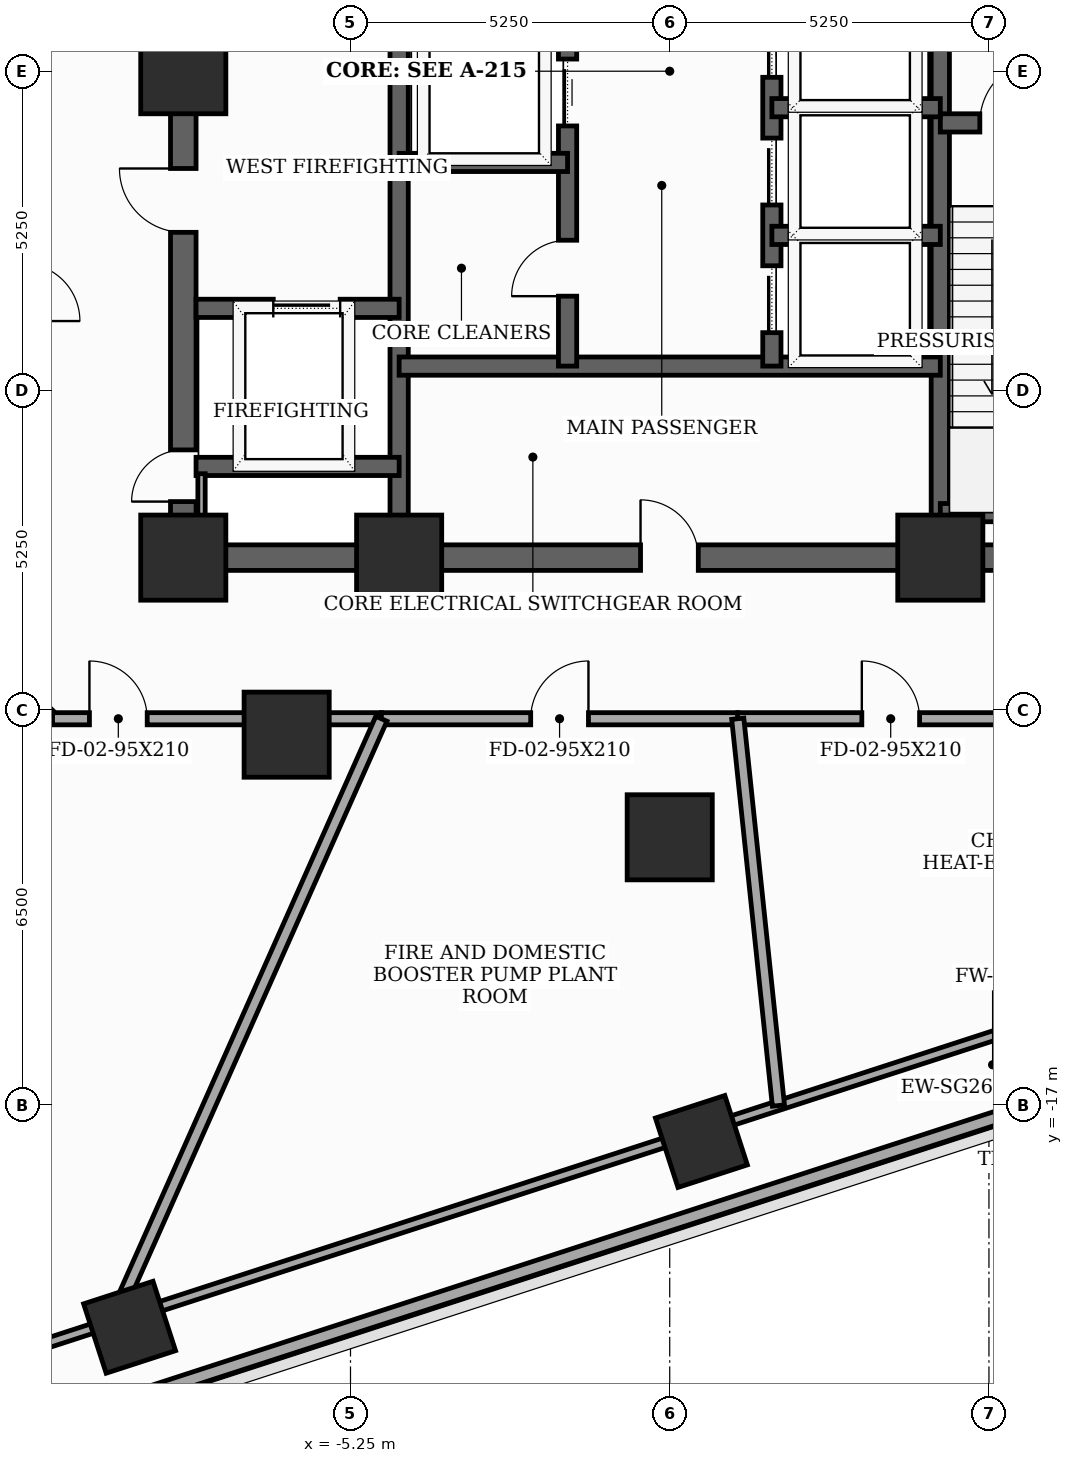
"""IFC4 building model, lengths in metres.
Left out: names, types, materials, properties, quantities, classifications, styles, units other than length and angle.
Written with IfcOpenShell. Run it as: python <this file> out.ifc"""

import sys

from ifc_helpers import new_model, si_unit, direction, frame, frame_2d, origin, origin_2d, place, context, subcontext, project, spatial, rectangle, extrude, element, fill, save


model = new_model("IFC4")
c1 = context("Model", 3, precision=1e-05, world=origin(), true_north=direction((0.0, 1.0)))
c2 = subcontext(c1, "Body", "Model", "MODEL_VIEW")
j1 = project(units=[si_unit("LENGTHUNIT", "METRE"), si_unit("PLANEANGLEUNIT", "RADIAN")], contexts=[c1])
p1 = place(None, origin())
s1 = spatial("IfcSite", under=j1, at=p1, CompositionType="ELEMENT")
p2 = place(p1, origin())
s2 = spatial("IfcBuilding", under=s1, at=p2, CompositionType="ELEMENT")
p3 = place(p2, frame((0.0, 0.0, 85.2)))
s3 = spatial("IfcBuildingStorey", under=s2, at=p3, CompositionType="ELEMENT", Elevation=85.2)
for number, where, z_axis, x_axis in (
    (1, (-8.0, -8.0, 0.0), (0.0, 0.0, 1.0), (1.0, 0.0, 0.0)),
    (2, (-4.45, -8.0, 0.0), (0.0, 0.0, 1.0), (1.0, 0.0, 0.0)),
    (3, (4.45, -8.0, 0.0), (0.0, 0.0, 1.0), (1.0, 0.0, 0.0)),
    (4, (-8.0, 0.0, 0.0), (0.0, 0.0, 1.0), (1.0, 0.0, 0.0)),
    (5, (-6.3, -10.912, 0.0), (0.0, 0.0, 1.0), (1.0, 0.0, 0.0)),
    (6, (0.0, -12.6, 0.0), (0.0, 0.0, 1.0), (1.0, 0.0, 0.0)),
):
    element("IfcColumn", number, at=place(p3, frame(where, z_axis=z_axis, x_axis=x_axis)), inside=s3, PredefinedType="COLUMN", context=c2, shape_type="SweptSolid", body=[
        extrude(rectangle(XDim=1.4, YDim=1.4, at=origin_2d()), origin(), (0.0, 0.0, 1.0), 5.1),
    ])
for number, where, z_axis, x_axis in (
    (7, (-8.883, -20.658, 0.0), (0.0, 0.0, 1.0), (0.951, 0.309, 0.0)),
    (8, (0.521, -17.603, 0.0), (0.0, 0.0, 1.0), (0.951, 0.309, 0.0)),
):
    element("IfcColumn", number, at=place(p3, frame(where, z_axis=z_axis, x_axis=x_axis)), inside=s3, PredefinedType="COLUMN", context=c2, shape_type="SweptSolid", body=[
        extrude(rectangle(XDim=1.2, YDim=1.2, at=origin_2d()), origin(), (0.0, 0.0, 1.0), 5.1),
    ])
for number, where, z_axis, x_axis in (
    (9, (-17.938, -24.788, 0.0), (0.0, 0.0, 1.0), (0.951, 0.309, 0.0)),
    (10, (30.436, -3.14, 0.0), (0.0, 0.0, 1.0), (-0.743, 0.669, 0.0)),
):
    element("IfcWall", number, at=place(p3, frame(where, z_axis=z_axis, x_axis=x_axis)), inside=s3, PredefinedType="SOLIDWALL", context=c2, shape_type="SweptSolid", body=[
        extrude(rectangle(XDim=49.44, YDim=0.22, at=frame_2d((24.72, 0.0))), origin(), (0.0, 0.0, 1.0), 4.4),
    ])
p4 = place(p3, frame((-8.0, -8.0, 0.0), z_axis=(0.0, 0.0, 1.0), x_axis=(0.0, 1.0, 0.0)))
e11 = element("IfcWall", 11, at=p4, inside=s3, PredefinedType="SHEAR", context=c2, shape_type="SweptSolid", body=[
    extrude(rectangle(XDim=16.0, YDim=0.42, at=frame_2d((8.0, 0.0))), origin(), (0.0, 0.0, 1.0), 4.9),
])
p5 = place(p4, frame((0.922, 0.0, 0.0)))
e12 = element("IfcOpeningElement", 12, at=p5, cuts=e11, PredefinedType="OPENING", context=c2, shape_type="SweptSolid", body=[
    extrude(rectangle(XDim=0.85, YDim=2.02, at=frame_2d((0.425, 1.01))), frame((0.0, 0.22, 0.0), z_axis=(0.0, -1.0, 0.0), x_axis=(1.0, 0.0, 0.0)), (0.0, 0.0, 1.0), 0.44),
])
p6 = place(p4, frame((5.35, 0.0, 0.0)))
e13 = element("IfcOpeningElement", 13, at=p6, cuts=e11, PredefinedType="OPENING", context=c2, shape_type="SweptSolid", body=[
    extrude(rectangle(XDim=1.05, YDim=2.15, at=frame_2d((0.525, 1.075))), frame((0.0, 0.22, 0.0), z_axis=(0.0, -1.0, 0.0), x_axis=(1.0, 0.0, 0.0)), (0.0, 0.0, 1.0), 0.44),
])
p7 = place(p3, frame((-8.0, -8.0, 0.0), z_axis=(0.0, 0.0, 1.0), x_axis=(1.0, 0.0, 0.0)))
e14 = element("IfcWall", 14, at=p7, inside=s3, PredefinedType="SHEAR", context=c2, shape_type="SweptSolid", body=[
    extrude(rectangle(XDim=16.0, YDim=0.42, at=frame_2d((8.0, 0.0))), origin(), (0.0, 0.0, 1.0), 4.9),
])
p8 = place(p7, frame((7.52, 0.0, 0.0)))
e15 = element("IfcOpeningElement", 15, at=p8, cuts=e14, PredefinedType="OPENING", context=c2, shape_type="SweptSolid", body=[
    extrude(rectangle(XDim=0.95, YDim=2.1, at=frame_2d((0.475, 1.05))), frame((0.0, 0.22, 0.0), z_axis=(0.0, -1.0, 0.0), x_axis=(1.0, 0.0, 0.0)), (0.0, 0.0, 1.0), 0.44),
])
for number, where, z_axis, x_axis in (
    (16, (-4.45, -7.79, 0.0), (0.0, 0.0, 1.0), (0.0, 1.0, 0.0)),
    (17, (4.45, -7.79, 0.0), (0.0, 0.0, 1.0), (0.0, 1.0, 0.0)),
):
    element("IfcWall", number, at=place(p3, frame(where, z_axis=z_axis, x_axis=x_axis)), inside=s3, PredefinedType="SHEAR", context=c2, shape_type="SweptSolid", body=[
        extrude(rectangle(XDim=15.58, YDim=0.3, at=frame_2d((7.79, 0.0))), origin(), (0.0, 0.0, 1.0), 4.9),
    ])
p9 = place(p3, frame((4.45, -0.85, 0.0), z_axis=(0.0, 0.0, 1.0), x_axis=(1.0, 0.0, 0.0)))
e18 = element("IfcWall", 18, at=p9, inside=s3, PredefinedType="SHEAR", context=c2, shape_type="SweptSolid", body=[
    extrude(rectangle(XDim=3.34, YDim=0.3, at=frame_2d((1.67, 0.0))), origin(), (0.0, 0.0, 1.0), 4.9),
])
p10 = place(p9, frame((0.65, 0.0, 0.0)))
e19 = element("IfcOpeningElement", 19, at=p10, cuts=e18, PredefinedType="OPENING", context=c2, shape_type="SweptSolid", body=[
    extrude(rectangle(XDim=1.05, YDim=2.15, at=frame_2d((0.525, 1.075))), frame((0.0, 0.16, 0.0), z_axis=(0.0, -1.0, 0.0), x_axis=(1.0, 0.0, 0.0)), (0.0, 0.0, 1.0), 0.32),
])
p11 = place(p3, frame((4.45, -7.26, 0.0), z_axis=(0.0, 0.0, 1.0), x_axis=(1.0, 0.0, 0.0)))
e20 = element("IfcWall", 20, at=p11, inside=s3, PredefinedType="SHEAR", context=c2, shape_type="SweptSolid", body=[
    extrude(rectangle(XDim=3.55, YDim=0.3, at=frame_2d((1.775, 0.0))), origin(), (0.0, 0.0, 1.0), 4.9),
])
p12 = place(p3, frame((-7.79, -3.9, 0.0), z_axis=(0.0, 0.0, 1.0), x_axis=(1.0, 0.0, 0.0)))
e21 = element("IfcWall", 21, at=p12, inside=s3, PredefinedType="SHEAR", context=c2, shape_type="SweptSolid", body=[
    extrude(rectangle(XDim=3.34, YDim=0.3, at=frame_2d((1.67, 0.0))), origin(), (0.0, 0.0, 1.0), 4.9),
])
p13 = place(p12, frame((1.27, 0.0, 0.0)))
e22 = element("IfcOpeningElement", 22, at=p13, cuts=e21, PredefinedType="OPENING", context=c2, shape_type="SweptSolid", body=[
    extrude(rectangle(XDim=1.1, YDim=2.1, at=frame_2d((0.55, 1.05))), frame((0.0, 0.16, 0.0), z_axis=(0.0, -1.0, 0.0), x_axis=(1.0, 0.0, 0.0)), (0.0, 0.0, 1.0), 0.32),
])
p14 = place(p3, frame((-7.79, -6.5, 0.0), z_axis=(0.0, 0.0, 1.0), x_axis=(1.0, 0.0, 0.0)))
e23 = element("IfcWall", 23, at=p14, inside=s3, PredefinedType="SHEAR", context=c2, shape_type="SweptSolid", body=[
    extrude(rectangle(XDim=3.34, YDim=0.3, at=frame_2d((1.67, 0.0))), origin(), (0.0, 0.0, 1.0), 4.9),
])
p15 = place(p3, frame((-4.45, -4.85, 0.0), z_axis=(0.0, 0.0, 1.0), x_axis=(1.0, 0.0, 0.0)))
e24 = element("IfcWall", 24, at=p15, inside=s3, PredefinedType="SHEAR", context=c2, shape_type="SweptSolid", body=[
    extrude(rectangle(XDim=8.9, YDim=0.3, at=frame_2d((4.45, 0.0))), origin(), (0.0, 0.0, 1.0), 4.9),
])
p16 = place(p3, frame((-1.68, -4.85, 0.0), z_axis=(0.0, 0.0, 1.0), x_axis=(0.0, 1.0, 0.0)))
e25 = element("IfcWall", 25, at=p16, inside=s3, PredefinedType="SHEAR", context=c2, shape_type="SweptSolid", body=[
    extrude(rectangle(XDim=12.64, YDim=0.3, at=frame_2d((6.32, 0.0))), origin(), (0.0, 0.0, 1.0), 4.9),
])
p17 = place(p16, frame((3.95, 0.0, 0.0)))
e26 = element("IfcOpeningElement", 26, at=p17, cuts=e25, PredefinedType="OPENING", context=c2, shape_type="SweptSolid", body=[
    extrude(rectangle(XDim=1.1, YDim=2.1, at=frame_2d((0.55, 1.05))), frame((0.0, 0.16, 0.0), z_axis=(0.0, -1.0, 0.0), x_axis=(1.0, 0.0, 0.0)), (0.0, 0.0, 1.0), 0.32),
])
p18 = place(p16, frame((6.25, 0.0, 0.0)))
e27 = element("IfcOpeningElement", 27, at=p18, cuts=e25, PredefinedType="OPENING", context=c2, shape_type="SweptSolid", body=[
    extrude(rectangle(XDim=1.1, YDim=2.1, at=frame_2d((0.55, 1.05))), frame((0.0, 0.16, 0.0), z_axis=(0.0, -1.0, 0.0), x_axis=(1.0, 0.0, 0.0)), (0.0, 0.0, 1.0), 0.32),
])
p19 = place(p16, frame((8.55, 0.0, 0.0)))
e28 = element("IfcOpeningElement", 28, at=p19, cuts=e25, PredefinedType="OPENING", context=c2, shape_type="SweptSolid", body=[
    extrude(rectangle(XDim=1.1, YDim=2.1, at=frame_2d((0.55, 1.05))), frame((0.0, 0.16, 0.0), z_axis=(0.0, -1.0, 0.0), x_axis=(1.0, 0.0, 0.0)), (0.0, 0.0, 1.0), 0.32),
])
p20 = place(p16, frame((10.85, 0.0, 0.0)))
e29 = element("IfcOpeningElement", 29, at=p20, cuts=e25, PredefinedType="OPENING", context=c2, shape_type="SweptSolid", body=[
    extrude(rectangle(XDim=1.1, YDim=2.1, at=frame_2d((0.55, 1.05))), frame((0.0, 0.16, 0.0), z_axis=(0.0, -1.0, 0.0), x_axis=(1.0, 0.0, 0.0)), (0.0, 0.0, 1.0), 0.32),
])
p21 = place(p16, frame((1.15, 0.0, 0.0)))
e30 = element("IfcOpeningElement", 30, at=p21, cuts=e25, PredefinedType="OPENING", context=c2, shape_type="SweptSolid", body=[
    extrude(rectangle(XDim=0.92, YDim=2.1, at=frame_2d((0.46, 1.05))), frame((0.0, 0.16, 0.0), z_axis=(0.0, -1.0, 0.0), x_axis=(1.0, 0.0, 0.0)), (0.0, 0.0, 1.0), 0.32),
])
p22 = place(p3, frame((1.68, -4.85, 0.0), z_axis=(0.0, 0.0, 1.0), x_axis=(0.0, 1.0, 0.0)))
e31 = element("IfcWall", 31, at=p22, inside=s3, PredefinedType="SHEAR", context=c2, shape_type="SweptSolid", body=[
    extrude(rectangle(XDim=12.64, YDim=0.3, at=frame_2d((6.32, 0.0))), origin(), (0.0, 0.0, 1.0), 4.9),
])
p23 = place(p22, frame((0.55, 0.0, 0.0)))
e32 = element("IfcOpeningElement", 32, at=p23, cuts=e31, PredefinedType="OPENING", context=c2, shape_type="SweptSolid", body=[
    extrude(rectangle(XDim=1.1, YDim=2.1, at=frame_2d((0.55, 1.05))), frame((0.0, 0.16, 0.0), z_axis=(0.0, -1.0, 0.0), x_axis=(1.0, 0.0, 0.0)), (0.0, 0.0, 1.0), 0.32),
])
p24 = place(p22, frame((2.65, 0.0, 0.0)))
e33 = element("IfcOpeningElement", 33, at=p24, cuts=e31, PredefinedType="OPENING", context=c2, shape_type="SweptSolid", body=[
    extrude(rectangle(XDim=1.1, YDim=2.1, at=frame_2d((0.55, 1.05))), frame((0.0, 0.16, 0.0), z_axis=(0.0, -1.0, 0.0), x_axis=(1.0, 0.0, 0.0)), (0.0, 0.0, 1.0), 0.32),
])
p25 = place(p22, frame((4.75, 0.0, 0.0)))
e34 = element("IfcOpeningElement", 34, at=p25, cuts=e31, PredefinedType="OPENING", context=c2, shape_type="SweptSolid", body=[
    extrude(rectangle(XDim=1.1, YDim=2.1, at=frame_2d((0.55, 1.05))), frame((0.0, 0.16, 0.0), z_axis=(0.0, -1.0, 0.0), x_axis=(1.0, 0.0, 0.0)), (0.0, 0.0, 1.0), 0.32),
])
p26 = place(p22, frame((6.85, 0.0, 0.0)))
e35 = element("IfcOpeningElement", 35, at=p26, cuts=e31, PredefinedType="OPENING", context=c2, shape_type="SweptSolid", body=[
    extrude(rectangle(XDim=1.1, YDim=2.1, at=frame_2d((0.55, 1.05))), frame((0.0, 0.16, 0.0), z_axis=(0.0, -1.0, 0.0), x_axis=(1.0, 0.0, 0.0)), (0.0, 0.0, 1.0), 0.32),
])
p27 = place(p22, frame((8.95, 0.0, 0.0)))
e36 = element("IfcOpeningElement", 36, at=p27, cuts=e31, PredefinedType="OPENING", context=c2, shape_type="SweptSolid", body=[
    extrude(rectangle(XDim=1.1, YDim=2.1, at=frame_2d((0.55, 1.05))), frame((0.0, 0.16, 0.0), z_axis=(0.0, -1.0, 0.0), x_axis=(1.0, 0.0, 0.0)), (0.0, 0.0, 1.0), 0.32),
])
p28 = place(p22, frame((11.05, 0.0, 0.0)))
e37 = element("IfcOpeningElement", 37, at=p28, cuts=e31, PredefinedType="OPENING", context=c2, shape_type="SweptSolid", body=[
    extrude(rectangle(XDim=1.1, YDim=2.1, at=frame_2d((0.55, 1.05))), frame((0.0, 0.16, 0.0), z_axis=(0.0, -1.0, 0.0), x_axis=(1.0, 0.0, 0.0)), (0.0, 0.0, 1.0), 0.32),
])
for number, where, z_axis, x_axis in (
    (38, (-4.45, -1.5, 0.0), (0.0, 0.0, 1.0), (1.0, 0.0, 0.0)),
    (39, (1.68, -2.7, 0.0), (0.0, 0.0, 1.0), (1.0, 0.0, 0.0)),
    (40, (1.68, -0.6, 0.0), (0.0, 0.0, 1.0), (1.0, 0.0, 0.0)),
):
    element("IfcWall", number, at=place(p3, frame(where, z_axis=z_axis, x_axis=x_axis)), inside=s3, PredefinedType="SHEAR", context=c2, shape_type="SweptSolid", body=[
        extrude(rectangle(XDim=2.77, YDim=0.3, at=frame_2d((1.385, 0.0))), origin(), (0.0, 0.0, 1.0), 4.9),
    ])
p29 = place(p3, frame((-7.036, 28.85, 0.0), z_axis=(0.0, 0.0, 1.0), x_axis=(0.743144937383, -0.669130482075, 0.0)))
e41 = element("IfcWall", 41, at=p29, inside=s3, PredefinedType="SOLIDWALL", context=c2, shape_type="SweptSolid", body=[
    extrude(rectangle(XDim=49.066, YDim=0.16, at=frame_2d((24.533, 0.0))), origin(), (0.0, 0.0, 1.0), 3.485),
])
p30 = place(p3, frame((28.503, -8.332, 0.0), z_axis=(0.0, 0.0, 1.0), x_axis=(-0.951056261584, -0.309017778296, 0.0)))
e42 = element("IfcWall", 42, at=p30, inside=s3, PredefinedType="SOLIDWALL", context=c2, shape_type="SweptSolid", body=[
    extrude(rectangle(XDim=49.066, YDim=0.16, at=frame_2d((24.533, 0.0))), origin(), (0.0, 0.0, 1.0), 3.485),
])
p31 = place(p3, frame((-10.65, -10.15, 0.0), z_axis=(0.0, 0.0, 1.0), x_axis=(0.707106781187, -0.707106781187, 0.0)))
e43 = element("IfcWall", 43, at=p31, inside=s3, PredefinedType="SOLIDWALL", context=c2, shape_type="SweptSolid", body=[
    extrude(rectangle(XDim=0.707, YDim=0.2, at=frame_2d((0.354, 0.0))), origin(), (0.0, 0.0, 1.0), 4.9),
])
p32 = place(p3, frame((-10.15, -10.65, 0.0), z_axis=(0.0, 0.0, 1.0), x_axis=(1.0, 0.0, 0.0)))
e44 = element("IfcWall", 44, at=p32, inside=s3, PredefinedType="SOLIDWALL", context=c2, shape_type="SweptSolid", body=[
    extrude(rectangle(XDim=5.408, YDim=0.2, at=frame_2d((2.704, 0.0))), origin(), (0.0, 0.0, 1.0), 4.285),
])
p33 = place(p32, frame((0.607, 0.0, 0.0)))
e45 = element("IfcOpeningElement", 45, at=p33, cuts=e44, PredefinedType="OPENING", context=c2, shape_type="SweptSolid", body=[
    extrude(rectangle(XDim=0.95, YDim=2.1, at=frame_2d((0.475, 1.05))), frame((0.0, 0.11, 0.0), z_axis=(0.0, -1.0, 0.0), x_axis=(1.0, 0.0, 0.0)), (0.0, 0.0, 1.0), 0.22),
])
p34 = place(p3, frame((-4.742, -10.65, 0.0), z_axis=(0.0, 0.0, 1.0), x_axis=(1.0, 0.0, 0.0)))
e46 = element("IfcWall", 46, at=p34, inside=s3, PredefinedType="SOLIDWALL", context=c2, shape_type="SweptSolid", body=[
    extrude(rectangle(XDim=5.861, YDim=0.2, at=frame_2d((2.93, 0.0))), origin(), (0.0, 0.0, 1.0), 4.285),
])
p35 = place(p34, frame((2.456, 0.0, 0.0)))
e47 = element("IfcOpeningElement", 47, at=p35, cuts=e46, PredefinedType="OPENING", context=c2, shape_type="SweptSolid", body=[
    extrude(rectangle(XDim=0.95, YDim=2.1, at=frame_2d((0.475, 1.05))), frame((0.0, 0.11, 0.0), z_axis=(0.0, -1.0, 0.0), x_axis=(1.0, 0.0, 0.0)), (0.0, 0.0, 1.0), 0.22),
])
p36 = place(p3, frame((1.119, -10.65, 0.0), z_axis=(0.0, 0.0, 1.0), x_axis=(1.0, 0.0, 0.0)))
e48 = element("IfcWall", 48, at=p36, inside=s3, PredefinedType="SOLIDWALL", context=c2, shape_type="SweptSolid", body=[
    extrude(rectangle(XDim=6.619, YDim=0.2, at=frame_2d((3.31, 0.0))), origin(), (0.0, 0.0, 1.0), 3.485),
])
p37 = place(p36, frame((2.04, 0.0, 0.0)))
e49 = element("IfcOpeningElement", 49, at=p37, cuts=e48, PredefinedType="OPENING", context=c2, shape_type="SweptSolid", body=[
    extrude(rectangle(XDim=0.95, YDim=2.1, at=frame_2d((0.475, 1.05))), frame((0.0, 0.11, 0.0), z_axis=(0.0, -1.0, 0.0), x_axis=(1.0, 0.0, 0.0)), (0.0, 0.0, 1.0), 0.22),
])
p38 = place(p3, frame((-9.158, -20.569, 0.0), z_axis=(0.0, 0.0, 1.0), x_axis=(0.406714194676, 0.913555451984, 0.0)))
e50 = element("IfcWall", 50, at=p38, inside=s3, PredefinedType="SOLIDWALL", context=c2, shape_type="SweptSolid", body=[
    extrude(rectangle(XDim=10.858, YDim=0.2, at=frame_2d((5.429, 0.0))), origin(), (0.0, 0.0, 1.0), 3.485),
])
p39 = place(p3, frame((1.788, -17.012, 0.0), z_axis=(0.0, 0.0, 1.0), x_axis=(-0.104603336042, 0.994514023073, 0.0)))
e51 = element("IfcWall", 51, at=p39, inside=s3, PredefinedType="SOLIDWALL", context=c2, shape_type="SweptSolid", body=[
    extrude(rectangle(XDim=6.397, YDim=0.2, at=frame_2d((3.199, 0.0))), origin(), (0.0, 0.0, 1.0), 3.485),
])
p40 = place(p3, frame((-7.7, -7.75, 0.0), z_axis=(0.0, 0.0, 1.0), x_axis=(0.0, 1.0, 0.0)))
e52 = element("IfcWall", 52, at=p40, inside=s3, PredefinedType="PLUMBINGWALL", context=c2, shape_type="SweptSolid", body=[
    extrude(rectangle(XDim=1.13, YDim=0.12, at=frame_2d((0.565, 0.0))), origin(), (0.0, 0.0, 1.0), 4.9),
])
p41 = place(p5, origin())
e53 = element("IfcDoor", 53, at=p41, inside=s3, OperationType="SINGLE_SWING_LEFT", PredefinedType="TRAPDOOR", context=c2, shape_type="SweptSolid", body=[
    extrude(rectangle(XDim=0.85, YDim=2.02, at=frame_2d((0.425, 1.01))), frame((0.0, 0.025, 0.0), z_axis=(0.0, -1.0, 0.0), x_axis=(1.0, 0.0, 0.0)), (0.0, 0.0, 1.0), 0.05),
])
fill(e12, e53)
p42 = place(p6, origin())
e54 = element("IfcDoor", 54, at=p42, inside=s3, OperationType="SINGLE_SWING_RIGHT", PredefinedType="DOOR", context=c2, shape_type="SweptSolid", body=[
    extrude(rectangle(XDim=1.05, YDim=2.15, at=frame_2d((0.525, 1.075))), frame((0.0, 0.025, 0.0), z_axis=(0.0, -1.0, 0.0), x_axis=(1.0, 0.0, 0.0)), (0.0, 0.0, 1.0), 0.05),
])
fill(e13, e54)
p43 = place(p8, origin())
e55 = element("IfcDoor", 55, at=p43, inside=s3, OperationType="SINGLE_SWING_LEFT", PredefinedType="DOOR", context=c2, shape_type="SweptSolid", body=[
    extrude(rectangle(XDim=0.95, YDim=2.1, at=frame_2d((0.475, 1.05))), frame((0.0, 0.025, 0.0), z_axis=(0.0, -1.0, 0.0), x_axis=(1.0, 0.0, 0.0)), (0.0, 0.0, 1.0), 0.05),
])
fill(e15, e55)
p44 = place(p10, origin())
e56 = element("IfcDoor", 56, at=p44, inside=s3, OperationType="SINGLE_SWING_RIGHT", PredefinedType="DOOR", context=c2, shape_type="SweptSolid", body=[
    extrude(rectangle(XDim=1.05, YDim=2.15, at=frame_2d((0.525, 1.075))), frame((0.0, 0.025, 0.0), z_axis=(0.0, -1.0, 0.0), x_axis=(1.0, 0.0, 0.0)), (0.0, 0.0, 1.0), 0.05),
])
fill(e19, e56)
p45 = place(p13, origin())
e57 = element("IfcDoor", 57, at=p45, inside=s3, OperationType="SLIDING_TO_LEFT", PredefinedType="DOOR", context=c2, shape_type="SweptSolid", body=[
    extrude(rectangle(XDim=1.1, YDim=2.1, at=frame_2d((0.55, 1.05))), frame((0.0, 0.025, 0.0), z_axis=(0.0, -1.0, 0.0), x_axis=(1.0, 0.0, 0.0)), (0.0, 0.0, 1.0), 0.05),
])
fill(e22, e57)
p46 = place(p17, origin())
e58 = element("IfcDoor", 58, at=p46, inside=s3, OperationType="SLIDING_TO_LEFT", PredefinedType="DOOR", context=c2, shape_type="SweptSolid", body=[
    extrude(rectangle(XDim=1.1, YDim=2.1, at=frame_2d((0.55, 1.05))), frame((0.0, 0.025, 0.0), z_axis=(0.0, -1.0, 0.0), x_axis=(1.0, 0.0, 0.0)), (0.0, 0.0, 1.0), 0.05),
])
fill(e26, e58)
p47 = place(p21, origin())
e59 = element("IfcDoor", 59, at=p47, inside=s3, OperationType="SINGLE_SWING_LEFT", PredefinedType="DOOR", context=c2, shape_type="SweptSolid", body=[
    extrude(rectangle(XDim=0.92, YDim=2.1, at=frame_2d((0.46, 1.05))), frame((0.0, 0.025, 0.0), z_axis=(0.0, -1.0, 0.0), x_axis=(1.0, 0.0, 0.0)), (0.0, 0.0, 1.0), 0.05),
])
fill(e30, e59)
p48 = place(p23, origin())
e60 = element("IfcDoor", 60, at=p48, inside=s3, OperationType="SLIDING_TO_LEFT", PredefinedType="DOOR", context=c2, shape_type="SweptSolid", body=[
    extrude(rectangle(XDim=1.1, YDim=2.1, at=frame_2d((0.55, 1.05))), frame((0.0, 0.025, 0.0), z_axis=(0.0, -1.0, 0.0), x_axis=(1.0, 0.0, 0.0)), (0.0, 0.0, 1.0), 0.05),
])
fill(e32, e60)
p49 = place(p24, origin())
e61 = element("IfcDoor", 61, at=p49, inside=s3, OperationType="SLIDING_TO_LEFT", PredefinedType="DOOR", context=c2, shape_type="SweptSolid", body=[
    extrude(rectangle(XDim=1.1, YDim=2.1, at=frame_2d((0.55, 1.05))), frame((0.0, 0.025, 0.0), z_axis=(0.0, -1.0, 0.0), x_axis=(1.0, 0.0, 0.0)), (0.0, 0.0, 1.0), 0.05),
])
fill(e33, e61)
p50 = place(p25, origin())
e62 = element("IfcDoor", 62, at=p50, inside=s3, OperationType="SLIDING_TO_LEFT", PredefinedType="DOOR", context=c2, shape_type="SweptSolid", body=[
    extrude(rectangle(XDim=1.1, YDim=2.1, at=frame_2d((0.55, 1.05))), frame((0.0, 0.025, 0.0), z_axis=(0.0, -1.0, 0.0), x_axis=(1.0, 0.0, 0.0)), (0.0, 0.0, 1.0), 0.05),
])
fill(e34, e62)
p51 = place(p33, origin())
e63 = element("IfcDoor", 63, at=p51, inside=s3, OperationType="SINGLE_SWING_LEFT", PredefinedType="DOOR", context=c2, shape_type="SweptSolid", body=[
    extrude(rectangle(XDim=0.95, YDim=2.1, at=frame_2d((0.475, 1.05))), frame((0.0, 0.025, 0.0), z_axis=(0.0, -1.0, 0.0), x_axis=(1.0, 0.0, 0.0)), (0.0, 0.0, 1.0), 0.05),
])
fill(e45, e63)
p52 = place(p35, origin())
e64 = element("IfcDoor", 64, at=p52, inside=s3, OperationType="SINGLE_SWING_RIGHT", PredefinedType="DOOR", context=c2, shape_type="SweptSolid", body=[
    extrude(rectangle(XDim=0.95, YDim=2.1, at=frame_2d((0.475, 1.05))), frame((0.0, 0.025, 0.0), z_axis=(0.0, -1.0, 0.0), x_axis=(1.0, 0.0, 0.0)), (0.0, 0.0, 1.0), 0.05),
])
fill(e47, e64)
p53 = place(p37, origin())
e65 = element("IfcDoor", 65, at=p53, inside=s3, OperationType="SINGLE_SWING_LEFT", PredefinedType="DOOR", context=c2, shape_type="SweptSolid", body=[
    extrude(rectangle(XDim=0.95, YDim=2.1, at=frame_2d((0.475, 1.05))), frame((0.0, 0.025, 0.0), z_axis=(0.0, -1.0, 0.0), x_axis=(1.0, 0.0, 0.0)), (0.0, 0.0, 1.0), 0.05),
])
fill(e49, e65)
save(model, sys.argv[1])
